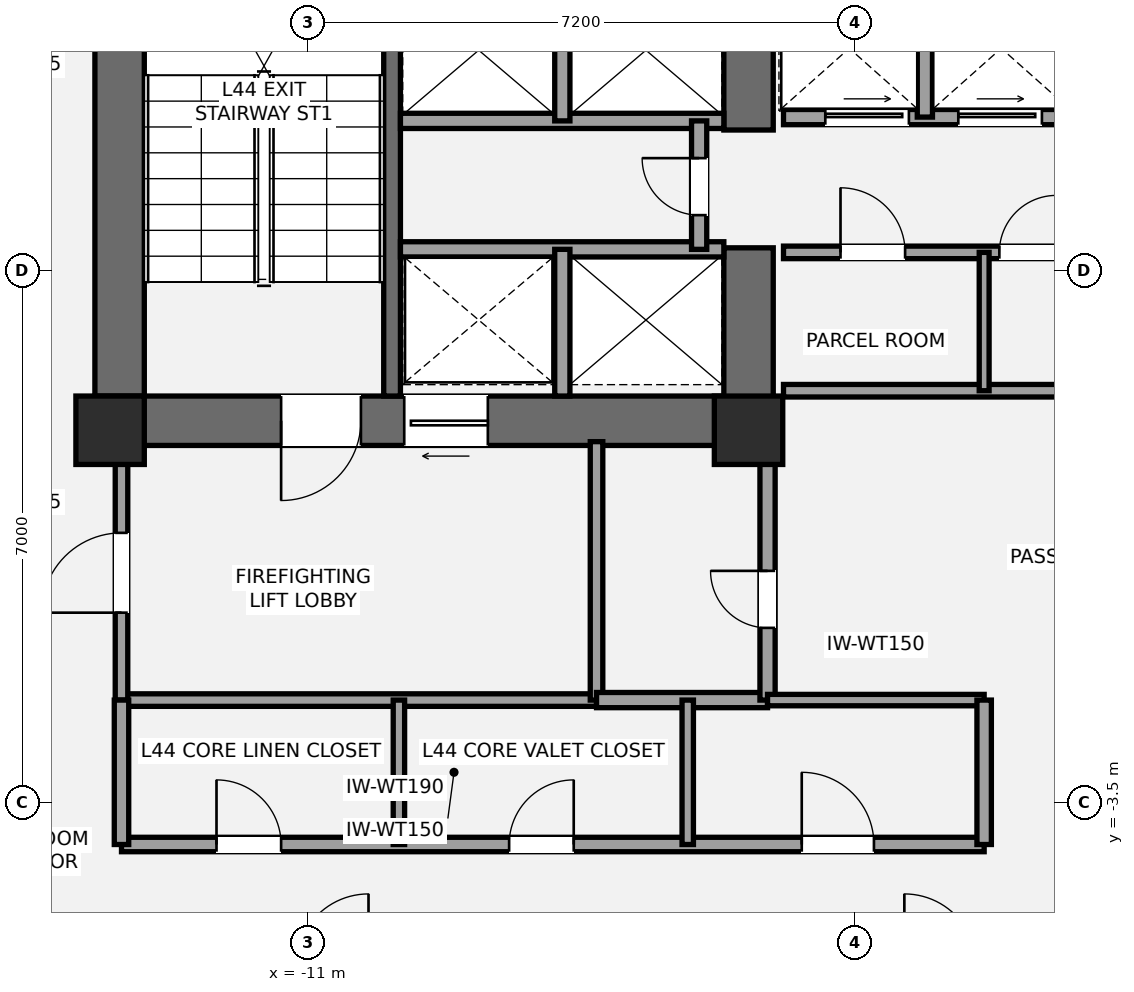
"""IFC4 building model, lengths in metres.
Left out: names, types, materials, properties, quantities, classifications, styles, units other than length and angle.
Written with IfcOpenShell. Run it as: python <this file> out.ifc"""

import sys

from ifc_helpers import new_model, si_unit, direction, frame, frame_2d, origin, origin_2d, place, context, subcontext, project, spatial, rectangle, extrude, element, fill, save


model = new_model("IFC4")
c1 = context("Model", 3, precision=1e-05, world=origin(), true_north=direction((0.0, 1.0)))
c2 = subcontext(c1, "Body", "Model", "MODEL_VIEW")
j1 = project(units=[si_unit("LENGTHUNIT", "METRE"), si_unit("PLANEANGLEUNIT", "RADIAN")], contexts=[c1])
p1 = place(None, origin())
s1 = spatial("IfcSite", under=j1, at=p1, CompositionType="ELEMENT")
p2 = place(p1, origin())
s2 = spatial("IfcBuilding", under=s1, at=p2, CompositionType="ELEMENT")
p3 = place(p2, frame((0.0, 0.0, 163.0)))
s3 = spatial("IfcBuildingStorey", under=s2, at=p3, CompositionType="ELEMENT", Elevation=163.0)
p4 = place(p3, frame((-13.475, 1.2, 0.0), z_axis=(0.0, 0.0, 1.0), x_axis=(0.0, 1.0, 0.0)))
e1 = element("IfcWall", 1, at=p4, inside=s3, PredefinedType="SHEAR", context=c2, shape_type="SweptSolid", body=[
    extrude(rectangle(XDim=8.45, YDim=0.65, at=frame_2d((4.225, 0.0))), origin(), (0.0, 0.0, 1.0), 3.2),
])
p5 = place(p3, frame((-4.875, 1.525, 0.0), z_axis=(0.0, 0.0, 1.0), x_axis=(-1.0, 0.0, 0.0)))
e2 = element("IfcWall", 2, at=p5, inside=s3, PredefinedType="SHEAR", context=c2, shape_type="SweptSolid", body=[
    extrude(rectangle(XDim=8.925, YDim=0.65, at=frame_2d((4.462, 0.0))), origin(), (0.0, 0.0, 1.0), 3.2),
])
p6 = place(p5, frame((5.425, 0.0, 0.0)))
e3 = element("IfcOpeningElement", 3, at=p6, cuts=e2, PredefinedType="OPENING", context=c2, shape_type="SweptSolid", body=[
    extrude(rectangle(XDim=1.05, YDim=2.15, at=frame_2d((0.525, 1.075))), frame((0.0, 0.335, 0.0), z_axis=(0.0, -1.0, 0.0), x_axis=(1.0, 0.0, 0.0)), (0.0, 0.0, 1.0), 0.67),
])
p7 = place(p5, frame((3.755, 0.0, 0.0)))
e4 = element("IfcOpeningElement", 4, at=p7, cuts=e2, PredefinedType="OPENING", context=c2, shape_type="SweptSolid", body=[
    extrude(rectangle(XDim=1.1, YDim=2.2, at=frame_2d((0.55, 1.1))), frame((0.0, 0.335, 0.0), z_axis=(0.0, -1.0, 0.0), x_axis=(1.0, 0.0, 0.0)), (0.0, 0.0, 1.0), 0.67),
])
p8 = place(p3, frame((-5.2, 1.2, 0.0), z_axis=(0.0, 0.0, 1.0), x_axis=(0.0, 1.0, 0.0)))
e5 = element("IfcWall", 5, at=p8, inside=s3, PredefinedType="SHEAR", context=c2, shape_type="SweptSolid", body=[
    extrude(rectangle(XDim=2.6, YDim=0.65, at=frame_2d((1.3, 0.0))), origin(), (0.0, 0.0, 1.0), 3.2),
])
p9 = place(p3, frame((-5.2, 5.35, 0.0), z_axis=(0.0, 0.0, 1.0), x_axis=(0.0, 1.0, 0.0)))
e6 = element("IfcWall", 6, at=p9, inside=s3, PredefinedType="SHEAR", context=c2, shape_type="SweptSolid", body=[
    extrude(rectangle(XDim=2.0, YDim=0.65, at=frame_2d((1.0, 0.0))), origin(), (0.0, 0.0, 1.0), 3.2),
])
p10 = place(p3, frame((-9.89, 1.85, 0.0), z_axis=(0.0, 0.0, 1.0), x_axis=(0.0, 1.0, 0.0)))
e7 = element("IfcWall", 7, at=p10, inside=s3, PredefinedType="SHEAR", context=c2, shape_type="SweptSolid", body=[
    extrude(rectangle(XDim=7.15, YDim=0.22, at=frame_2d((3.575, 0.0))), origin(), (0.0, 0.0, 1.0), 3.2),
])
for number, where, z_axis, x_axis in (
    (8, (-13.6, 1.4, 0.0), (0.0, 0.0, 1.0), (1.0, 0.0, 0.0)),
    (9, (-5.2, 1.4, 0.0), (0.0, 0.0, 1.0), (1.0, 0.0, 0.0)),
):
    element("IfcColumn", number, at=place(p3, frame(where, z_axis=z_axis, x_axis=x_axis)), inside=s3, PredefinedType="COLUMN", context=c2, shape_type="SweptSolid", body=[
        extrude(rectangle(XDim=0.9, YDim=0.9, at=origin_2d()), origin(), (0.0, 0.0, 1.0), 3.2),
    ])
p11 = place(p3, frame((-13.45, -2.15, 0.0), z_axis=(0.0, 0.0, 1.0), x_axis=(1.0, 0.0, 0.0)))
e10 = element("IfcWall", 10, at=p11, inside=s3, PredefinedType="PARTITIONING", context=c2, shape_type="SweptSolid", body=[
    extrude(rectangle(XDim=6.25, YDim=0.165, at=frame_2d((3.125, 0.0))), origin(), (0.0, 0.0, 1.0), 3.02),
])
p12 = place(p3, frame((-13.45, -2.15, 0.0), z_axis=(0.0, 0.0, 1.0), x_axis=(0.0, 1.0, 0.0)))
e11 = element("IfcWall", 11, at=p12, inside=s3, PredefinedType="PARTITIONING", context=c2, shape_type="SweptSolid", body=[
    extrude(rectangle(XDim=3.4, YDim=0.165, at=frame_2d((1.7, 0.0))), origin(), (0.0, 0.0, 1.0), 2.473),
])
p13 = place(p12, frame((1.15, 0.0, 0.0)))
e12 = element("IfcOpeningElement", 12, at=p13, cuts=e11, PredefinedType="OPENING", context=c2, shape_type="SweptSolid", body=[
    extrude(rectangle(XDim=1.05, YDim=2.15, at=frame_2d((0.525, 1.075))), frame((0.0, 0.093, 0.0), z_axis=(0.0, -1.0, 0.0), x_axis=(1.0, 0.0, 0.0)), (0.0, 0.0, 1.0), 0.185),
])
p14 = place(p3, frame((-7.2, -2.15, 0.0), z_axis=(0.0, 0.0, 1.0), x_axis=(0.0, 1.0, 0.0)))
e13 = element("IfcWall", 13, at=p14, inside=s3, PredefinedType="PARTITIONING", context=c2, shape_type="SweptSolid", body=[
    extrude(rectangle(XDim=3.4, YDim=0.165, at=frame_2d((1.7, 0.0))), origin(), (0.0, 0.0, 1.0), 2.473),
])
p15 = place(p3, frame((-7.2, -2.15, 0.0), z_axis=(0.0, 0.0, 1.0), x_axis=(1.0, 0.0, 0.0)))
e14 = element("IfcWall", 14, at=p15, inside=s3, PredefinedType="SOLIDWALL", context=c2, shape_type="SweptSolid", body=[
    extrude(rectangle(XDim=2.25, YDim=0.2, at=frame_2d((1.125, 0.0))), origin(), (0.0, 0.0, 1.0), 3.02),
])
p16 = place(p3, frame((-4.95, -2.15, 0.0), z_axis=(0.0, 0.0, 1.0), x_axis=(0.0, 1.0, 0.0)))
e15 = element("IfcWall", 15, at=p16, inside=s3, PredefinedType="SOLIDWALL", context=c2, shape_type="SweptSolid", body=[
    extrude(rectangle(XDim=3.4, YDim=0.2, at=frame_2d((1.7, 0.0))), origin(), (0.0, 0.0, 1.0), 2.473),
])
p17 = place(p16, frame((0.95, 0.0, 0.0)))
e16 = element("IfcOpeningElement", 16, at=p17, cuts=e15, PredefinedType="OPENING", context=c2, shape_type="SweptSolid", body=[
    extrude(rectangle(XDim=0.75, YDim=2.1, at=frame_2d((0.375, 1.05))), frame((0.0, 0.11, 0.0), z_axis=(0.0, -1.0, 0.0), x_axis=(1.0, 0.0, 0.0)), (0.0, 0.0, 1.0), 0.22),
])
p18 = place(p3, frame((-9.78, 3.78, 0.0), z_axis=(0.0, 0.0, 1.0), x_axis=(1.0, 0.0, 0.0)))
e17 = element("IfcWall", 17, at=p18, inside=s3, PredefinedType="SOLIDWALL", context=c2, shape_type="SweptSolid", body=[
    extrude(rectangle(XDim=4.255, YDim=0.2, at=frame_2d((2.127, 0.0))), origin(), (0.0, 0.0, 1.0), 3.02),
])
p19 = place(p3, frame((-7.65, 1.85, 0.0), z_axis=(0.0, 0.0, 1.0), x_axis=(0.0, 1.0, 0.0)))
e18 = element("IfcWall", 18, at=p19, inside=s3, PredefinedType="SOLIDWALL", context=c2, shape_type="SweptSolid", body=[
    extrude(rectangle(XDim=1.93, YDim=0.2, at=frame_2d((0.965, 0.0))), origin(), (0.0, 0.0, 1.0), 3.02),
])
p20 = place(p3, frame((-9.78, 5.47, 0.0), z_axis=(0.0, 0.0, 1.0), x_axis=(1.0, 0.0, 0.0)))
e19 = element("IfcWall", 19, at=p20, inside=s3, PredefinedType="SOLIDWALL", context=c2, shape_type="SweptSolid", body=[
    extrude(rectangle(XDim=4.255, YDim=0.2, at=frame_2d((2.127, 0.0))), origin(), (0.0, 0.0, 1.0), 3.02),
])
p21 = place(p3, frame((-7.65, 5.47, 0.0), z_axis=(0.0, 0.0, 1.0), x_axis=(0.0, 1.0, 0.0)))
e20 = element("IfcWall", 20, at=p21, inside=s3, PredefinedType="SOLIDWALL", context=c2, shape_type="SweptSolid", body=[
    extrude(rectangle(XDim=1.86, YDim=0.2, at=frame_2d((0.93, 0.0))), origin(), (0.0, 0.0, 1.0), 3.02),
])
p22 = place(p3, frame((-5.85, 3.78, 0.0), z_axis=(0.0, 0.0, 1.0), x_axis=(0.0, 1.0, 0.0)))
e21 = element("IfcWall", 21, at=p22, inside=s3, PredefinedType="SOLIDWALL", context=c2, shape_type="SweptSolid", body=[
    extrude(rectangle(XDim=1.69, YDim=0.2, at=frame_2d((0.845, 0.0))), origin(), (0.0, 0.0, 1.0), 3.02),
])
p23 = place(p22, frame((0.45, 0.0, 0.0)))
e22 = element("IfcOpeningElement", 22, at=p23, cuts=e21, PredefinedType="OPENING", context=c2, shape_type="SweptSolid", body=[
    extrude(rectangle(XDim=0.75, YDim=2.1, at=frame_2d((0.375, 1.05))), frame((0.0, 0.11, 0.0), z_axis=(0.0, -1.0, 0.0), x_axis=(1.0, 0.0, 0.0)), (0.0, 0.0, 1.0), 0.22),
])
p24 = place(p3, frame((-4.74, 1.92, 0.0), z_axis=(0.0, 0.0, 1.0), x_axis=(1.0, 0.0, 0.0)))
e23 = element("IfcWall", 23, at=p24, inside=s3, PredefinedType="PARTITIONING", context=c2, shape_type="SweptSolid", body=[
    extrude(rectangle(XDim=3.89, YDim=0.165, at=frame_2d((1.945, 0.0))), origin(), (0.0, 0.0, 1.0), 2.16),
])
p25 = place(p3, frame((-4.74, 3.74, 0.0), z_axis=(0.0, 0.0, 1.0), x_axis=(1.0, 0.0, 0.0)))
e24 = element("IfcWall", 24, at=p25, inside=s3, PredefinedType="PARTITIONING", context=c2, shape_type="SweptSolid", body=[
    extrude(rectangle(XDim=3.89, YDim=0.165, at=frame_2d((1.945, 0.0))), origin(), (0.0, 0.0, 1.0), 3.02),
])
p26 = place(p25, frame((0.75, 0.0, 0.0)))
e25 = element("IfcOpeningElement", 25, at=p26, cuts=e24, PredefinedType="OPENING", context=c2, shape_type="SweptSolid", body=[
    extrude(rectangle(XDim=0.85, YDim=2.1, at=frame_2d((0.425, 1.05))), frame((0.0, 0.093, 0.0), z_axis=(0.0, -1.0, 0.0), x_axis=(1.0, 0.0, 0.0)), (0.0, 0.0, 1.0), 0.185),
])
p27 = place(p25, frame((2.84, 0.0, 0.0)))
e26 = element("IfcOpeningElement", 26, at=p27, cuts=e24, PredefinedType="OPENING", context=c2, shape_type="SweptSolid", body=[
    extrude(rectangle(XDim=0.75, YDim=2.1, at=frame_2d((0.375, 1.05))), frame((0.0, 0.093, 0.0), z_axis=(0.0, -1.0, 0.0), x_axis=(1.0, 0.0, 0.0)), (0.0, 0.0, 1.0), 0.185),
])
p28 = place(p3, frame((-2.1, 1.92, 0.0), z_axis=(0.0, 0.0, 1.0), x_axis=(0.0, 1.0, 0.0)))
e27 = element("IfcWall", 27, at=p28, inside=s3, PredefinedType="PARTITIONING", context=c2, shape_type="SweptSolid", body=[
    extrude(rectangle(XDim=1.82, YDim=0.13, at=frame_2d((0.91, 0.0))), origin(), (0.0, 0.0, 1.0), 3.02),
])
p29 = place(p3, frame((-4.74, 5.52, 0.0), z_axis=(0.0, 0.0, 1.0), x_axis=(1.0, 0.0, 0.0)))
e28 = element("IfcWall", 28, at=p29, inside=s3, PredefinedType="SOLIDWALL", context=c2, shape_type="SweptSolid", body=[
    extrude(rectangle(XDim=3.86, YDim=0.2, at=frame_2d((1.93, 0.0))), origin(), (0.0, 0.0, 1.0), 3.02),
])
p30 = place(p29, frame((0.55, 0.0, 0.0)))
e29 = element("IfcOpeningElement", 29, at=p30, cuts=e28, PredefinedType="OPENING", context=c2, shape_type="SweptSolid", body=[
    extrude(rectangle(XDim=1.1, YDim=2.2, at=frame_2d((0.55, 1.1))), frame((0.0, 0.11, 0.0), z_axis=(0.0, -1.0, 0.0), x_axis=(1.0, 0.0, 0.0)), (0.0, 0.0, 1.0), 0.22),
])
p31 = place(p29, frame((2.3, 0.0, 0.0)))
e30 = element("IfcOpeningElement", 30, at=p31, cuts=e28, PredefinedType="OPENING", context=c2, shape_type="SweptSolid", body=[
    extrude(rectangle(XDim=1.1, YDim=2.2, at=frame_2d((0.55, 1.1))), frame((0.0, 0.11, 0.0), z_axis=(0.0, -1.0, 0.0), x_axis=(1.0, 0.0, 0.0)), (0.0, 0.0, 1.0), 0.22),
])
p32 = place(p3, frame((-2.88, 5.52, 0.0), z_axis=(0.0, 0.0, 1.0), x_axis=(0.0, 1.0, 0.0)))
e31 = element("IfcWall", 31, at=p32, inside=s3, PredefinedType="SOLIDWALL", context=c2, shape_type="SweptSolid", body=[
    extrude(rectangle(XDim=1.81, YDim=0.2, at=frame_2d((0.905, 0.0))), origin(), (0.0, 0.0, 1.0), 3.02),
])
p33 = place(p3, frame((-13.45, -4.05, 0.0), z_axis=(0.0, 0.0, 1.0), x_axis=(1.0, 0.0, 0.0)))
e32 = element("IfcWall", 32, at=p33, inside=s3, PredefinedType="PLUMBINGWALL", context=c2, shape_type="SweptSolid", body=[
    extrude(rectangle(XDim=11.35, YDim=0.19, at=frame_2d((5.675, 0.0))), origin(), (0.0, 0.0, 1.0), 2.555),
])
p34 = place(p33, frame((1.25, 0.0, 0.0)))
e33 = element("IfcOpeningElement", 33, at=p34, cuts=e32, PredefinedType="OPENING", context=c2, shape_type="SweptSolid", body=[
    extrude(rectangle(XDim=0.85, YDim=2.1, at=frame_2d((0.425, 1.05))), frame((0.0, 0.105, 0.0), z_axis=(0.0, -1.0, 0.0), x_axis=(1.0, 0.0, 0.0)), (0.0, 0.0, 1.0), 0.21),
])
p35 = place(p33, frame((5.1, 0.0, 0.0)))
e34 = element("IfcOpeningElement", 34, at=p35, cuts=e32, PredefinedType="OPENING", context=c2, shape_type="SweptSolid", body=[
    extrude(rectangle(XDim=0.85, YDim=2.1, at=frame_2d((0.425, 1.05))), frame((0.0, 0.105, 0.0), z_axis=(0.0, -1.0, 0.0), x_axis=(1.0, 0.0, 0.0)), (0.0, 0.0, 1.0), 0.21),
])
p36 = place(p33, frame((8.95, 0.0, 0.0)))
e35 = element("IfcOpeningElement", 35, at=p36, cuts=e32, PredefinedType="OPENING", context=c2, shape_type="SweptSolid", body=[
    extrude(rectangle(XDim=0.95, YDim=2.15, at=frame_2d((0.475, 1.075))), frame((0.0, 0.105, 0.0), z_axis=(0.0, -1.0, 0.0), x_axis=(1.0, 0.0, 0.0)), (0.0, 0.0, 1.0), 0.21),
])
p37 = place(p3, frame((-4.95, -2.15, 0.0), z_axis=(0.0, 0.0, 1.0), x_axis=(1.0, 0.0, 0.0)))
e36 = element("IfcWall", 36, at=p37, inside=s3, PredefinedType="PLUMBINGWALL", context=c2, shape_type="SweptSolid", body=[
    extrude(rectangle(XDim=2.85, YDim=0.15, at=frame_2d((1.425, 0.0))), origin(), (0.0, 0.0, 1.0), 2.473),
])
p38 = place(p3, frame((-13.45, -4.05, 0.0), z_axis=(0.0, 0.0, 1.0), x_axis=(0.0, 1.0, 0.0)))
e37 = element("IfcWall", 37, at=p38, inside=s3, PredefinedType="PLUMBINGWALL", context=c2, shape_type="SweptSolid", body=[
    extrude(rectangle(XDim=1.9, YDim=0.19, at=frame_2d((0.95, 0.0))), origin(), (0.0, 0.0, 1.0), 3.02),
])
p39 = place(p3, frame((-2.1, -4.05, 0.0), z_axis=(0.0, 0.0, 1.0), x_axis=(0.0, 1.0, 0.0)))
e38 = element("IfcWall", 38, at=p39, inside=s3, PredefinedType="PLUMBINGWALL", context=c2, shape_type="SweptSolid", body=[
    extrude(rectangle(XDim=1.9, YDim=0.19, at=frame_2d((0.95, 0.0))), origin(), (0.0, 0.0, 1.0), 2.473),
])
p40 = place(p3, frame((-9.8, -4.05, 0.0), z_axis=(0.0, 0.0, 1.0), x_axis=(0.0, 1.0, 0.0)))
e39 = element("IfcWall", 39, at=p40, inside=s3, PredefinedType="PLUMBINGWALL", context=c2, shape_type="SweptSolid", body=[
    extrude(rectangle(XDim=1.9, YDim=0.15, at=frame_2d((0.95, 0.0))), origin(), (0.0, 0.0, 1.0), 3.02),
])
p41 = place(p3, frame((-6.0, -4.05, 0.0), z_axis=(0.0, 0.0, 1.0), x_axis=(0.0, 1.0, 0.0)))
e40 = element("IfcWall", 40, at=p41, inside=s3, PredefinedType="PLUMBINGWALL", context=c2, shape_type="SweptSolid", body=[
    extrude(rectangle(XDim=1.9, YDim=0.15, at=frame_2d((0.95, 0.0))), origin(), (0.0, 0.0, 1.0), 2.473),
])
p42 = place(p6, origin())
e41 = element("IfcDoor", 41, at=p42, inside=s3, OperationType="SINGLE_SWING_RIGHT", PredefinedType="DOOR", context=c2, shape_type="SweptSolid", body=[
    extrude(rectangle(XDim=1.05, YDim=2.15, at=frame_2d((0.525, 1.075))), frame((0.0, 0.025, 0.0), z_axis=(0.0, -1.0, 0.0), x_axis=(1.0, 0.0, 0.0)), (0.0, 0.0, 1.0), 0.05),
])
fill(e3, e41)
p43 = place(p13, origin())
e42 = element("IfcDoor", 42, at=p43, inside=s3, OperationType="SINGLE_SWING_LEFT", PredefinedType="DOOR", context=c2, shape_type="SweptSolid", body=[
    extrude(rectangle(XDim=1.05, YDim=2.15, at=frame_2d((0.525, 1.075))), frame((0.0, 0.025, 0.0), z_axis=(0.0, -1.0, 0.0), x_axis=(1.0, 0.0, 0.0)), (0.0, 0.0, 1.0), 0.05),
])
fill(e12, e42)
p44 = place(p17, origin())
e43 = element("IfcDoor", 43, at=p44, inside=s3, OperationType="SINGLE_SWING_RIGHT", PredefinedType="DOOR", context=c2, shape_type="SweptSolid", body=[
    extrude(rectangle(XDim=0.75, YDim=2.1, at=frame_2d((0.375, 1.05))), frame((0.0, 0.025, 0.0), z_axis=(0.0, -1.0, 0.0), x_axis=(1.0, 0.0, 0.0)), (0.0, 0.0, 1.0), 0.05),
])
fill(e16, e43)
p45 = place(p7, origin())
e44 = element("IfcDoor", 44, at=p45, inside=s3, OperationType="SLIDING_TO_LEFT", PredefinedType="DOOR", context=c2, shape_type="SweptSolid", body=[
    extrude(rectangle(XDim=1.1, YDim=2.2, at=frame_2d((0.55, 1.1))), frame((0.0, 0.025, 0.0), z_axis=(0.0, -1.0, 0.0), x_axis=(1.0, 0.0, 0.0)), (0.0, 0.0, 1.0), 0.05),
])
fill(e4, e44)
p46 = place(p23, origin())
e45 = element("IfcDoor", 45, at=p46, inside=s3, OperationType="SINGLE_SWING_RIGHT", PredefinedType="DOOR", context=c2, shape_type="SweptSolid", body=[
    extrude(rectangle(XDim=0.75, YDim=2.1, at=frame_2d((0.375, 1.05))), frame((0.0, 0.025, 0.0), z_axis=(0.0, -1.0, 0.0), x_axis=(1.0, 0.0, 0.0)), (0.0, 0.0, 1.0), 0.05),
])
fill(e22, e45)
p47 = place(p26, origin())
e46 = element("IfcDoor", 46, at=p47, inside=s3, OperationType="SINGLE_SWING_LEFT", PredefinedType="DOOR", context=c2, shape_type="SweptSolid", body=[
    extrude(rectangle(XDim=0.85, YDim=2.1, at=frame_2d((0.425, 1.05))), frame((0.0, 0.025, 0.0), z_axis=(0.0, -1.0, 0.0), x_axis=(1.0, 0.0, 0.0)), (0.0, 0.0, 1.0), 0.05),
])
fill(e25, e46)
p48 = place(p27, origin())
e47 = element("IfcDoor", 47, at=p48, inside=s3, OperationType="SINGLE_SWING_RIGHT", PredefinedType="DOOR", context=c2, shape_type="SweptSolid", body=[
    extrude(rectangle(XDim=0.75, YDim=2.1, at=frame_2d((0.375, 1.05))), frame((0.0, 0.025, 0.0), z_axis=(0.0, -1.0, 0.0), x_axis=(1.0, 0.0, 0.0)), (0.0, 0.0, 1.0), 0.05),
])
fill(e26, e47)
p49 = place(p30, origin())
e48 = element("IfcDoor", 48, at=p49, inside=s3, OperationType="SLIDING_TO_LEFT", PredefinedType="DOOR", context=c2, shape_type="SweptSolid", body=[
    extrude(rectangle(XDim=1.1, YDim=2.2, at=frame_2d((0.55, 1.1))), frame((0.0, 0.025, 0.0), z_axis=(0.0, -1.0, 0.0), x_axis=(1.0, 0.0, 0.0)), (0.0, 0.0, 1.0), 0.05),
])
fill(e29, e48)
p50 = place(p31, origin())
e49 = element("IfcDoor", 49, at=p50, inside=s3, OperationType="SLIDING_TO_LEFT", PredefinedType="DOOR", context=c2, shape_type="SweptSolid", body=[
    extrude(rectangle(XDim=1.1, YDim=2.2, at=frame_2d((0.55, 1.1))), frame((0.0, 0.025, 0.0), z_axis=(0.0, -1.0, 0.0), x_axis=(1.0, 0.0, 0.0)), (0.0, 0.0, 1.0), 0.05),
])
fill(e30, e49)
p51 = place(p34, origin())
e50 = element("IfcDoor", 50, at=p51, inside=s3, OperationType="SINGLE_SWING_LEFT", PredefinedType="DOOR", context=c2, shape_type="SweptSolid", body=[
    extrude(rectangle(XDim=0.85, YDim=2.1, at=frame_2d((0.425, 1.05))), frame((0.0, 0.025, 0.0), z_axis=(0.0, -1.0, 0.0), x_axis=(1.0, 0.0, 0.0)), (0.0, 0.0, 1.0), 0.05),
])
fill(e33, e50)
p52 = place(p35, origin())
e51 = element("IfcDoor", 51, at=p52, inside=s3, OperationType="SINGLE_SWING_RIGHT", PredefinedType="DOOR", context=c2, shape_type="SweptSolid", body=[
    extrude(rectangle(XDim=0.85, YDim=2.1, at=frame_2d((0.425, 1.05))), frame((0.0, 0.025, 0.0), z_axis=(0.0, -1.0, 0.0), x_axis=(1.0, 0.0, 0.0)), (0.0, 0.0, 1.0), 0.05),
])
fill(e34, e51)
p53 = place(p36, origin())
e52 = element("IfcDoor", 52, at=p53, inside=s3, OperationType="SINGLE_SWING_LEFT", PredefinedType="DOOR", context=c2, shape_type="SweptSolid", body=[
    extrude(rectangle(XDim=0.95, YDim=2.15, at=frame_2d((0.475, 1.075))), frame((0.0, 0.025, 0.0), z_axis=(0.0, -1.0, 0.0), x_axis=(1.0, 0.0, 0.0)), (0.0, 0.0, 1.0), 0.05),
])
fill(e35, e52)
save(model, sys.argv[1])
